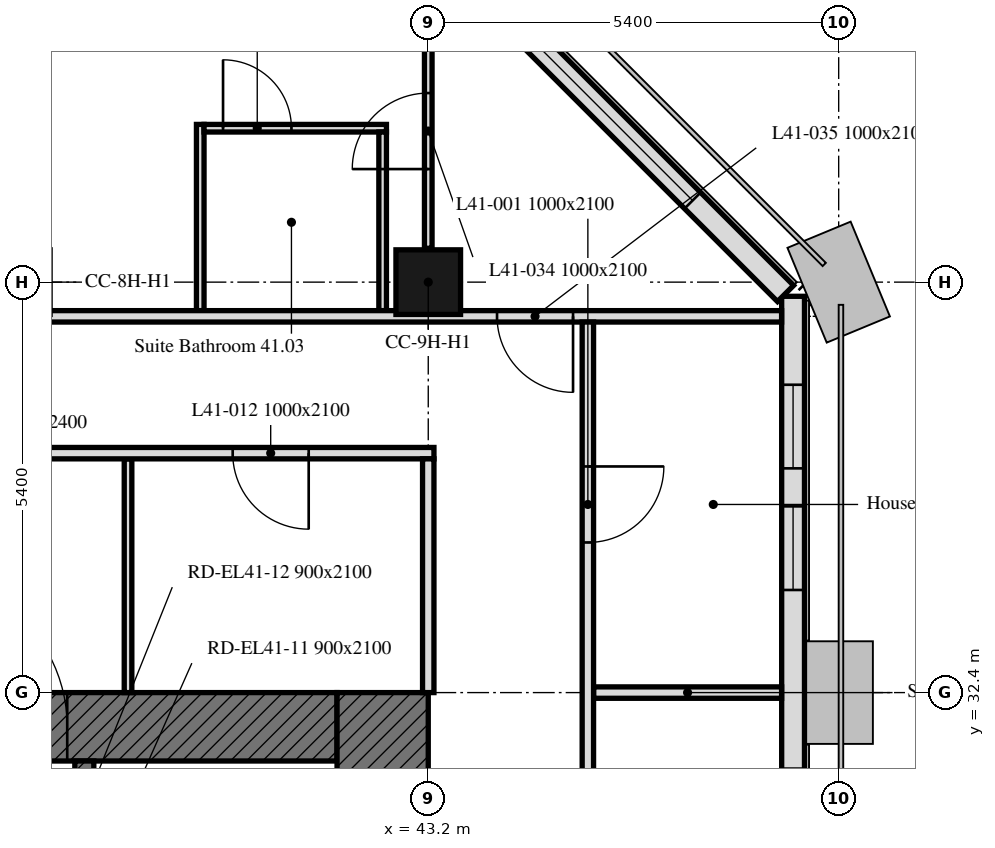
"""IFC4 building model, lengths in metres.
Left out: names, types, materials, properties, quantities, classifications, styles, units other than length and angle.
Written with IfcOpenShell. Run it as: python <this file> out.ifc"""

import sys

from ifc_helpers import new_model, si_unit, direction, frame, frame_2d, origin, origin_2d, place, context, subcontext, project, spatial, rectangle, extrude, element, fill, save


model = new_model("IFC4")
c1 = context("Model", 3, precision=1e-05, world=origin(), true_north=direction((0.0, 1.0)))
c2 = subcontext(c1, "Body", "Model", "MODEL_VIEW")
j1 = project(units=[si_unit("LENGTHUNIT", "METRE"), si_unit("PLANEANGLEUNIT", "RADIAN")], contexts=[c1])
p1 = place(None, origin())
s1 = spatial("IfcSite", under=j1, at=p1, CompositionType="ELEMENT")
p2 = place(p1, origin())
s2 = spatial("IfcBuilding", under=s1, at=p2, CompositionType="ELEMENT")
p3 = place(p2, frame((0.0, 0.0, 172.6)))
s3 = spatial("IfcBuildingStorey", under=s2, at=p3, CompositionType="ELEMENT", Elevation=172.6)
p4 = place(p3, frame((43.2, 37.8, 0.0), z_axis=(0.0, 0.0, 1.0), x_axis=(1.0, 0.0, 0.0)))
e1 = element("IfcColumn", 1, at=p4, inside=s3, PredefinedType="COLUMN", context=c2, shape_type="SweptSolid", body=[
    extrude(rectangle(XDim=0.85, YDim=0.85, at=origin_2d()), origin(), (0.0, 0.0, 1.0), 2.8),
])
p5 = place(p3, frame((48.0, 5.586, 0.0), z_axis=(0.0, 0.0, 1.0), x_axis=(0.0, 1.0, 0.0)))
e2 = element("IfcWall", 2, at=p5, inside=s3, PredefinedType="SOLIDWALL", context=c2, shape_type="SweptSolid", body=[
    extrude(rectangle(XDim=32.027, YDim=0.3, at=frame_2d((16.014, 0.0))), origin(), (0.0, 0.0, 1.0), 2.8),
])
p6 = place(p5, frame((1.164, 0.0, 0.9)))
e3 = element("IfcOpeningElement", 3, at=p6, cuts=e2, PredefinedType="OPENING", context=c2, shape_type="SweptSolid", body=[
    extrude(rectangle(XDim=1.1, YDim=1.7, at=frame_2d((0.55, 0.85))), frame((0.0, 0.16, 0.0), z_axis=(0.0, -1.0, 0.0), x_axis=(1.0, 0.0, 0.0)), (0.0, 0.0, 1.0), 0.32),
])
p7 = place(p5, frame((2.764, 0.0, 0.9)))
e4 = element("IfcOpeningElement", 4, at=p7, cuts=e2, PredefinedType="OPENING", context=c2, shape_type="SweptSolid", body=[
    extrude(rectangle(XDim=1.1, YDim=1.7, at=frame_2d((0.55, 0.85))), frame((0.0, 0.16, 0.0), z_axis=(0.0, -1.0, 0.0), x_axis=(1.0, 0.0, 0.0)), (0.0, 0.0, 1.0), 0.32),
])
p8 = place(p5, frame((6.564, 0.0, 0.9)))
e5 = element("IfcOpeningElement", 5, at=p8, cuts=e2, PredefinedType="OPENING", context=c2, shape_type="SweptSolid", body=[
    extrude(rectangle(XDim=1.1, YDim=1.7, at=frame_2d((0.55, 0.85))), frame((0.0, 0.16, 0.0), z_axis=(0.0, -1.0, 0.0), x_axis=(1.0, 0.0, 0.0)), (0.0, 0.0, 1.0), 0.32),
])
p9 = place(p5, frame((8.164, 0.0, 0.9)))
e6 = element("IfcOpeningElement", 6, at=p9, cuts=e2, PredefinedType="OPENING", context=c2, shape_type="SweptSolid", body=[
    extrude(rectangle(XDim=1.1, YDim=1.7, at=frame_2d((0.55, 0.85))), frame((0.0, 0.16, 0.0), z_axis=(0.0, -1.0, 0.0), x_axis=(1.0, 0.0, 0.0)), (0.0, 0.0, 1.0), 0.32),
])
p10 = place(p5, frame((11.614, 0.0, 0.9)))
e7 = element("IfcOpeningElement", 7, at=p10, cuts=e2, PredefinedType="OPENING", context=c2, shape_type="SweptSolid", body=[
    extrude(rectangle(XDim=3.4, YDim=1.7, at=frame_2d((1.7, 0.85))), frame((0.0, 0.16, 0.0), z_axis=(0.0, -1.0, 0.0), x_axis=(1.0, 0.0, 0.0)), (0.0, 0.0, 1.0), 0.32),
])
p11 = place(p5, frame((17.364, 0.0, 0.9)))
e8 = element("IfcOpeningElement", 8, at=p11, cuts=e2, PredefinedType="OPENING", context=c2, shape_type="SweptSolid", body=[
    extrude(rectangle(XDim=1.1, YDim=1.7, at=frame_2d((0.55, 0.85))), frame((0.0, 0.16, 0.0), z_axis=(0.0, -1.0, 0.0), x_axis=(1.0, 0.0, 0.0)), (0.0, 0.0, 1.0), 0.32),
])
p12 = place(p5, frame((18.964, 0.0, 0.9)))
e9 = element("IfcOpeningElement", 9, at=p12, cuts=e2, PredefinedType="OPENING", context=c2, shape_type="SweptSolid", body=[
    extrude(rectangle(XDim=1.1, YDim=1.7, at=frame_2d((0.55, 0.85))), frame((0.0, 0.16, 0.0), z_axis=(0.0, -1.0, 0.0), x_axis=(1.0, 0.0, 0.0)), (0.0, 0.0, 1.0), 0.32),
])
p13 = place(p5, frame((22.414, 0.0, 0.9)))
e10 = element("IfcOpeningElement", 10, at=p13, cuts=e2, PredefinedType="OPENING", context=c2, shape_type="SweptSolid", body=[
    extrude(rectangle(XDim=3.4, YDim=1.7, at=frame_2d((1.7, 0.85))), frame((0.0, 0.16, 0.0), z_axis=(0.0, -1.0, 0.0), x_axis=(1.0, 0.0, 0.0)), (0.0, 0.0, 1.0), 0.32),
])
p14 = place(p5, frame((28.164, 0.0, 0.9)))
e11 = element("IfcOpeningElement", 11, at=p14, cuts=e2, PredefinedType="OPENING", context=c2, shape_type="SweptSolid", body=[
    extrude(rectangle(XDim=1.1, YDim=1.7, at=frame_2d((0.55, 0.85))), frame((0.0, 0.16, 0.0), z_axis=(0.0, -1.0, 0.0), x_axis=(1.0, 0.0, 0.0)), (0.0, 0.0, 1.0), 0.32),
])
p15 = place(p5, frame((29.764, 0.0, 0.9)))
e12 = element("IfcOpeningElement", 12, at=p15, cuts=e2, PredefinedType="OPENING", context=c2, shape_type="SweptSolid", body=[
    extrude(rectangle(XDim=1.1, YDim=1.7, at=frame_2d((0.55, 0.85))), frame((0.0, 0.16, 0.0), z_axis=(0.0, -1.0, 0.0), x_axis=(1.0, 0.0, 0.0)), (0.0, 0.0, 1.0), 0.32),
])
p16 = place(p3, frame((47.901, 37.65, 0.0), z_axis=(0.0, 0.0, 1.0), x_axis=(-0.707106781187, 0.707106781187, 0.0)))
e13 = element("IfcWall", 13, at=p16, inside=s3, PredefinedType="SOLIDWALL", context=c2, shape_type="SweptSolid", body=[
    extrude(rectangle(XDim=6.86, YDim=0.3, at=frame_2d((3.43, 0.0))), origin(), (0.0, 0.0, 1.0), 2.8),
])
p17 = place(p16, frame((1.73, 0.0, 0.9)))
e14 = element("IfcOpeningElement", 14, at=p17, cuts=e13, PredefinedType="OPENING", context=c2, shape_type="SweptSolid", body=[
    extrude(rectangle(XDim=3.4, YDim=1.7, at=frame_2d((1.7, 0.85))), frame((0.0, 0.16, 0.0), z_axis=(0.0, -1.0, 0.0), x_axis=(1.0, 0.0, 0.0)), (0.0, 0.0, 1.0), 0.32),
])
p18 = place(p3, frame((30.9, 31.95, 0.0), z_axis=(0.0, 0.0, 1.0), x_axis=(1.0, 0.0, 0.0)))
e15 = element("IfcWall", 15, at=p18, inside=s3, PredefinedType="SOLIDWALL", context=c2, shape_type="SweptSolid", body=[
    extrude(rectangle(XDim=11.1, YDim=0.9, at=frame_2d((5.55, 0.0))), origin(), (0.0, 0.0, 1.0), 2.8),
])
p19 = place(p18, frame((5.55, 0.0, 0.0)))
e16 = element("IfcOpeningElement", 16, at=p19, cuts=e15, PredefinedType="OPENING", context=c2, shape_type="SweptSolid", body=[
    extrude(rectangle(XDim=2.0, YDim=2.4, at=frame_2d((1.0, 1.2))), frame((0.0, 0.45, 0.0), z_axis=(0.0, -1.0, 0.0), x_axis=(1.0, 0.0, 0.0)), (0.0, 0.0, 1.0), 0.9),
])
p20 = place(p3, frame((42.6, 32.4, 0.0), z_axis=(0.0, 0.0, 1.0), x_axis=(0.0, -1.0, 0.0)))
e17 = element("IfcWall", 17, at=p20, inside=s3, PredefinedType="SOLIDWALL", context=c2, shape_type="SweptSolid", body=[
    extrude(rectangle(XDim=16.2, YDim=1.2, at=frame_2d((8.1, 0.0))), origin(), (0.0, 0.0, 1.0), 2.8),
])
p21 = place(p3, frame((38.675, 17.1, 0.0), z_axis=(0.0, 0.0, 1.0), x_axis=(0.0, 1.0, 0.0)))
e18 = element("IfcWall", 18, at=p21, inside=s3, PredefinedType="SOLIDWALL", context=c2, shape_type="SweptSolid", body=[
    extrude(rectangle(XDim=14.4, YDim=0.25, at=frame_2d((7.2, 0.0))), origin(), (0.0, 0.0, 1.0), 2.8),
])
p22 = place(p21, frame((4.6, 0.0, 0.0)))
e19 = element("IfcOpeningElement", 19, at=p22, cuts=e18, PredefinedType="OPENING", context=c2, shape_type="SweptSolid", body=[
    extrude(rectangle(XDim=1.0, YDim=2.1, at=frame_2d((0.5, 1.05))), frame((0.0, 0.125, 0.0), z_axis=(0.0, -1.0, 0.0), x_axis=(1.0, 0.0, 0.0)), (0.0, 0.0, 1.0), 0.25),
])
p23 = place(p21, frame((7.062, 0.0, 0.0)))
e20 = element("IfcOpeningElement", 20, at=p23, cuts=e18, PredefinedType="OPENING", context=c2, shape_type="SweptSolid", body=[
    extrude(rectangle(XDim=1.2, YDim=2.1, at=frame_2d((0.6, 1.05))), frame((0.0, 0.125, 0.0), z_axis=(0.0, -1.0, 0.0), x_axis=(1.0, 0.0, 0.0)), (0.0, 0.0, 1.0), 0.25),
])
p24 = place(p21, frame((9.472, 0.0, 0.0)))
e21 = element("IfcOpeningElement", 21, at=p24, cuts=e18, PredefinedType="OPENING", context=c2, shape_type="SweptSolid", body=[
    extrude(rectangle(XDim=0.9, YDim=2.1, at=frame_2d((0.45, 1.05))), frame((0.0, 0.125, 0.0), z_axis=(0.0, -1.0, 0.0), x_axis=(1.0, 0.0, 0.0)), (0.0, 0.0, 1.0), 0.25),
])
p25 = place(p21, frame((10.779, 0.0, 0.0)))
e22 = element("IfcOpeningElement", 22, at=p25, cuts=e18, PredefinedType="OPENING", context=c2, shape_type="SweptSolid", body=[
    extrude(rectangle(XDim=0.9, YDim=2.1, at=frame_2d((0.45, 1.05))), frame((0.0, 0.125, 0.0), z_axis=(0.0, -1.0, 0.0), x_axis=(1.0, 0.0, 0.0)), (0.0, 0.0, 1.0), 0.25),
])
p26 = place(p21, frame((12.048, 0.0, 0.0)))
e23 = element("IfcOpeningElement", 23, at=p26, cuts=e18, PredefinedType="OPENING", context=c2, shape_type="SweptSolid", body=[
    extrude(rectangle(XDim=0.9, YDim=2.1, at=frame_2d((0.45, 1.05))), frame((0.0, 0.125, 0.0), z_axis=(0.0, -1.0, 0.0), x_axis=(1.0, 0.0, 0.0)), (0.0, 0.0, 1.0), 0.25),
])
p27 = place(p21, frame((13.354, 0.0, 0.0)))
e24 = element("IfcOpeningElement", 24, at=p27, cuts=e18, PredefinedType="OPENING", context=c2, shape_type="SweptSolid", body=[
    extrude(rectangle(XDim=0.9, YDim=2.1, at=frame_2d((0.45, 1.05))), frame((0.0, 0.125, 0.0), z_axis=(0.0, -1.0, 0.0), x_axis=(1.0, 0.0, 0.0)), (0.0, 0.0, 1.0), 0.25),
])
p28 = place(p3, frame((45.375, 32.4, 0.0), z_axis=(0.0, 0.0, 1.0), x_axis=(1.0, 0.0, 0.0)))
e25 = element("IfcWall", 25, at=p28, inside=s3, PredefinedType="PARTITIONING", context=c2, shape_type="SweptSolid", body=[
    extrude(rectangle(XDim=2.474, YDim=0.15, at=frame_2d((1.237, 0.0))), origin(), (0.0, 0.0, 1.0), 2.2),
])
p29 = place(p3, frame((40.2, 37.425, 0.0), z_axis=(0.0, 0.0, 1.0), x_axis=(0.0, 1.0, 0.0)))
e26 = element("IfcWall", 26, at=p29, inside=s3, PredefinedType="PARTITIONING", context=c2, shape_type="SweptSolid", body=[
    extrude(rectangle(XDim=2.45, YDim=0.1, at=frame_2d((1.225, 0.0))), origin(), (0.0, 0.0, 1.0), 2.8),
])
p30 = place(p3, frame((40.25, 39.825, 0.0), z_axis=(0.0, 0.0, 1.0), x_axis=(1.0, 0.0, 0.0)))
e27 = element("IfcWall", 27, at=p30, inside=s3, PredefinedType="PARTITIONING", context=c2, shape_type="SweptSolid", body=[
    extrude(rectangle(XDim=2.4, YDim=0.1, at=frame_2d((1.2, 0.0))), origin(), (0.0, 0.0, 1.0), 2.8),
])
p31 = place(p30, frame((0.25, 0.0, 0.0)))
e28 = element("IfcOpeningElement", 28, at=p31, cuts=e27, PredefinedType="OPENING", context=c2, shape_type="SweptSolid", body=[
    extrude(rectangle(XDim=0.9, YDim=2.1, at=frame_2d((0.45, 1.05))), frame((0.0, 0.05, 0.0), z_axis=(0.0, -1.0, 0.0), x_axis=(1.0, 0.0, 0.0)), (0.0, 0.0, 1.0), 0.1),
])
p32 = place(p3, frame((42.6, 39.775, 0.0), z_axis=(0.0, 0.0, 1.0), x_axis=(0.0, -1.0, 0.0)))
e29 = element("IfcWall", 29, at=p32, inside=s3, PredefinedType="PARTITIONING", context=c2, shape_type="SweptSolid", body=[
    extrude(rectangle(XDim=2.35, YDim=0.1, at=frame_2d((1.175, 0.0))), origin(), (0.0, 0.0, 1.0), 2.8),
])
p33 = place(p3, frame((43.2, 38.245, 0.0), z_axis=(0.0, 0.0, 1.0), x_axis=(0.0, 1.0, 0.0)))
e30 = element("IfcWall", 30, at=p33, inside=s3, PredefinedType="PARTITIONING", context=c2, shape_type="SweptSolid", body=[
    extrude(rectangle(XDim=3.843, YDim=0.1, at=frame_2d((1.921, 0.0))), origin(), (0.0, 0.0, 1.0), 2.8),
])
p34 = place(p33, frame((1.042, 0.0, 0.0)))
e31 = element("IfcOpeningElement", 31, at=p34, cuts=e30, PredefinedType="OPENING", context=c2, shape_type="SweptSolid", body=[
    extrude(rectangle(XDim=1.0, YDim=2.1, at=frame_2d((0.5, 1.05))), frame((0.0, 0.05, 0.0), z_axis=(0.0, -1.0, 0.0), x_axis=(1.0, 0.0, 0.0)), (0.0, 0.0, 1.0), 0.1),
])
p35 = place(p3, frame((47.849, 37.35, 0.0), z_axis=(0.0, 0.0, 1.0), x_axis=(-1.0, 0.0, 0.0)))
e32 = element("IfcWall", 32, at=p35, inside=s3, PredefinedType="PARTITIONING", context=c2, shape_type="SweptSolid", body=[
    extrude(rectangle(XDim=41.698, YDim=0.15, at=frame_2d((20.849, 0.0))), origin(), (0.0, 0.0, 1.0), 2.8),
])
p36 = place(p35, frame((39.249, 0.0, 0.0)))
e33 = element("IfcOpeningElement", 33, at=p36, cuts=e32, PredefinedType="OPENING", context=c2, shape_type="SweptSolid", body=[
    extrude(rectangle(XDim=1.0, YDim=2.1, at=frame_2d((0.5, 1.05))), frame((0.0, 0.075, 0.0), z_axis=(0.0, -1.0, 0.0), x_axis=(1.0, 0.0, 0.0)), (0.0, 0.0, 1.0), 0.15),
])
p37 = place(p35, frame((27.649, 0.0, 0.0)))
e34 = element("IfcOpeningElement", 34, at=p37, cuts=e32, PredefinedType="OPENING", context=c2, shape_type="SweptSolid", body=[
    extrude(rectangle(XDim=1.0, YDim=2.1, at=frame_2d((0.5, 1.05))), frame((0.0, 0.075, 0.0), z_axis=(0.0, -1.0, 0.0), x_axis=(1.0, 0.0, 0.0)), (0.0, 0.0, 1.0), 0.15),
])
p38 = place(p35, frame((22.249, 0.0, 0.0)))
e35 = element("IfcOpeningElement", 35, at=p38, cuts=e32, PredefinedType="OPENING", context=c2, shape_type="SweptSolid", body=[
    extrude(rectangle(XDim=1.0, YDim=2.1, at=frame_2d((0.5, 1.05))), frame((0.0, 0.075, 0.0), z_axis=(0.0, -1.0, 0.0), x_axis=(1.0, 0.0, 0.0)), (0.0, 0.0, 1.0), 0.15),
])
p39 = place(p35, frame((17.649, 0.0, 0.0)))
e36 = element("IfcOpeningElement", 36, at=p39, cuts=e32, PredefinedType="OPENING", context=c2, shape_type="SweptSolid", body=[
    extrude(rectangle(XDim=1.0, YDim=2.1, at=frame_2d((0.5, 1.05))), frame((0.0, 0.075, 0.0), z_axis=(0.0, -1.0, 0.0), x_axis=(1.0, 0.0, 0.0)), (0.0, 0.0, 1.0), 0.15),
])
p40 = place(p35, frame((2.744, 0.0, 0.0)))
e37 = element("IfcOpeningElement", 37, at=p40, cuts=e32, PredefinedType="OPENING", context=c2, shape_type="SweptSolid", body=[
    extrude(rectangle(XDim=1.0, YDim=2.1, at=frame_2d((0.5, 1.05))), frame((0.0, 0.075, 0.0), z_axis=(0.0, -1.0, 0.0), x_axis=(1.0, 0.0, 0.0)), (0.0, 0.0, 1.0), 0.15),
])
p41 = place(p3, frame((45.3, 37.275, 0.0), z_axis=(0.0, 0.0, 1.0), x_axis=(0.0, -1.0, 0.0)))
e38 = element("IfcWall", 38, at=p41, inside=s3, PredefinedType="PARTITIONING", context=c2, shape_type="SweptSolid", body=[
    extrude(rectangle(XDim=15.6, YDim=0.15, at=frame_2d((7.8, 0.0))), origin(), (0.0, 0.0, 1.0), 2.2),
])
p42 = place(p41, frame((1.9, 0.0, 0.0)))
e39 = element("IfcOpeningElement", 39, at=p42, cuts=e38, PredefinedType="OPENING", context=c2, shape_type="SweptSolid", body=[
    extrude(rectangle(XDim=1.0, YDim=2.1, at=frame_2d((0.5, 1.05))), frame((0.0, 0.075, 0.0), z_axis=(0.0, -1.0, 0.0), x_axis=(1.0, 0.0, 0.0)), (0.0, 0.0, 1.0), 0.15),
])
p43 = place(p41, frame((8.425, 0.0, 0.0)))
e40 = element("IfcOpeningElement", 40, at=p43, cuts=e38, PredefinedType="OPENING", context=c2, shape_type="SweptSolid", body=[
    extrude(rectangle(XDim=1.0, YDim=2.1, at=frame_2d((0.5, 1.05))), frame((0.0, 0.075, 0.0), z_axis=(0.0, -1.0, 0.0), x_axis=(1.0, 0.0, 0.0)), (0.0, 0.0, 1.0), 0.15),
])
p44 = place(p3, frame((39.25, 32.4, 0.0), z_axis=(0.0, 0.0, 1.0), x_axis=(0.0, 1.0, 0.0)))
e41 = element("IfcWall", 41, at=p44, inside=s3, PredefinedType="PARTITIONING", context=c2, shape_type="SweptSolid", body=[
    extrude(rectangle(XDim=3.075, YDim=0.1, at=frame_2d((1.538, 0.0))), origin(), (0.0, 0.0, 1.0), 2.8),
])
p45 = place(p3, frame((43.275, 35.55, 0.0), z_axis=(0.0, 0.0, 1.0), x_axis=(-1.0, 0.0, 0.0)))
e42 = element("IfcWall", 42, at=p45, inside=s3, PredefinedType="PARTITIONING", context=c2, shape_type="SweptSolid", body=[
    extrude(rectangle(XDim=33.825, YDim=0.15, at=frame_2d((16.913, 0.0))), origin(), (0.0, 0.0, 1.0), 2.8),
])
p46 = place(p45, frame((23.875, 0.0, 0.0)))
e43 = element("IfcOpeningElement", 43, at=p46, cuts=e42, PredefinedType="OPENING", context=c2, shape_type="SweptSolid", body=[
    extrude(rectangle(XDim=1.0, YDim=2.1, at=frame_2d((0.5, 1.05))), frame((0.0, 0.075, 0.0), z_axis=(0.0, -1.0, 0.0), x_axis=(1.0, 0.0, 0.0)), (0.0, 0.0, 1.0), 0.15),
])
p47 = place(p45, frame((13.475, 0.0, 0.0)))
e44 = element("IfcOpeningElement", 44, at=p47, cuts=e42, PredefinedType="OPENING", context=c2, shape_type="SweptSolid", body=[
    extrude(rectangle(XDim=1.0, YDim=2.1, at=frame_2d((0.5, 1.05))), frame((0.0, 0.075, 0.0), z_axis=(0.0, -1.0, 0.0), x_axis=(1.0, 0.0, 0.0)), (0.0, 0.0, 1.0), 0.15),
])
p48 = place(p45, frame((8.337, 0.0, 0.0)))
e45 = element("IfcOpeningElement", 45, at=p48, cuts=e42, PredefinedType="OPENING", context=c2, shape_type="SweptSolid", body=[
    extrude(rectangle(XDim=1.0, YDim=2.1, at=frame_2d((0.5, 1.05))), frame((0.0, 0.075, 0.0), z_axis=(0.0, -1.0, 0.0), x_axis=(1.0, 0.0, 0.0)), (0.0, 0.0, 1.0), 0.15),
])
p49 = place(p45, frame((1.648, 0.0, 0.0)))
e46 = element("IfcOpeningElement", 46, at=p49, cuts=e42, PredefinedType="OPENING", context=c2, shape_type="SweptSolid", body=[
    extrude(rectangle(XDim=1.0, YDim=2.1, at=frame_2d((0.5, 1.05))), frame((0.0, 0.075, 0.0), z_axis=(0.0, -1.0, 0.0), x_axis=(1.0, 0.0, 0.0)), (0.0, 0.0, 1.0), 0.15),
])
p50 = place(p45, frame((28.613, 0.0, 0.0)))
e47 = element("IfcOpeningElement", 47, at=p50, cuts=e42, PredefinedType="OPENING", context=c2, shape_type="SweptSolid", body=[
    extrude(rectangle(XDim=1.0, YDim=2.1, at=frame_2d((0.5, 1.05))), frame((0.0, 0.075, 0.0), z_axis=(0.0, -1.0, 0.0), x_axis=(1.0, 0.0, 0.0)), (0.0, 0.0, 1.0), 0.15),
])
p51 = place(p45, frame((30.625, 0.0, 0.0)))
e48 = element("IfcOpeningElement", 48, at=p51, cuts=e42, PredefinedType="OPENING", context=c2, shape_type="SweptSolid", body=[
    extrude(rectangle(XDim=1.8, YDim=2.4, at=frame_2d((0.9, 1.2))), frame((0.0, 0.075, 0.0), z_axis=(0.0, -1.0, 0.0), x_axis=(1.0, 0.0, 0.0)), (0.0, 0.0, 1.0), 0.15),
])
p52 = place(p45, frame((5.525, 0.0, 0.0)))
e49 = element("IfcOpeningElement", 49, at=p52, cuts=e42, PredefinedType="OPENING", context=c2, shape_type="SweptSolid", body=[
    extrude(rectangle(XDim=1.8, YDim=2.4, at=frame_2d((0.9, 1.2))), frame((0.0, 0.075, 0.0), z_axis=(0.0, -1.0, 0.0), x_axis=(1.0, 0.0, 0.0)), (0.0, 0.0, 1.0), 0.15),
])
p53 = place(p3, frame((43.2, 35.475, 0.0), z_axis=(0.0, 0.0, 1.0), x_axis=(0.0, -1.0, 0.0)))
e50 = element("IfcWall", 50, at=p53, inside=s3, PredefinedType="PARTITIONING", context=c2, shape_type="SweptSolid", body=[
    extrude(rectangle(XDim=3.075, YDim=0.15, at=frame_2d((1.538, 0.0))), origin(), (0.0, 0.0, 1.0), 2.8),
])
p54 = place(p14, origin())
e51 = element("IfcWindow", 51, at=p54, inside=s3, PartitioningType="SINGLE_PANEL", PredefinedType="WINDOW", context=c2, shape_type="SweptSolid", body=[
    extrude(rectangle(XDim=1.1, YDim=1.7, at=frame_2d((0.55, 0.85))), frame((0.0, 0.03, 0.0), z_axis=(0.0, -1.0, 0.0), x_axis=(1.0, 0.0, 0.0)), (0.0, 0.0, 1.0), 0.06),
])
fill(e11, e51)
p55 = place(p15, origin())
e52 = element("IfcWindow", 52, at=p55, inside=s3, PartitioningType="SINGLE_PANEL", PredefinedType="WINDOW", context=c2, shape_type="SweptSolid", body=[
    extrude(rectangle(XDim=1.1, YDim=1.7, at=frame_2d((0.55, 0.85))), frame((0.0, 0.03, 0.0), z_axis=(0.0, -1.0, 0.0), x_axis=(1.0, 0.0, 0.0)), (0.0, 0.0, 1.0), 0.06),
])
fill(e12, e52)
p56 = place(p17, origin())
e53 = element("IfcWindow", 53, at=p56, inside=s3, PartitioningType="SINGLE_PANEL", PredefinedType="WINDOW", context=c2, shape_type="SweptSolid", body=[
    extrude(rectangle(XDim=3.4, YDim=1.7, at=frame_2d((1.7, 0.85))), frame((0.0, 0.03, 0.0), z_axis=(0.0, -1.0, 0.0), x_axis=(1.0, 0.0, 0.0)), (0.0, 0.0, 1.0), 0.06),
])
fill(e14, e53)
p57 = place(p19, origin())
e54 = element("IfcDoor", 54, at=p57, inside=s3, OperationType="DOUBLE_DOOR_SINGLE_SWING", PredefinedType="DOOR", context=c2, shape_type="SweptSolid", body=[
    extrude(rectangle(XDim=2.0, YDim=2.4, at=frame_2d((1.0, 1.2))), frame((0.0, 0.025, 0.0), z_axis=(0.0, -1.0, 0.0), x_axis=(1.0, 0.0, 0.0)), (0.0, 0.0, 1.0), 0.05),
])
fill(e16, e54)
p58 = place(p42, origin())
e55 = element("IfcDoor", 55, at=p58, inside=s3, OperationType="SINGLE_SWING_LEFT", PredefinedType="DOOR", context=c2, shape_type="SweptSolid", body=[
    extrude(rectangle(XDim=1.0, YDim=2.1, at=frame_2d((0.5, 1.05))), frame((0.0, 0.025, 0.0), z_axis=(0.0, -1.0, 0.0), x_axis=(1.0, 0.0, 0.0)), (0.0, 0.0, 1.0), 0.05),
])
fill(e39, e55)
p59 = place(p31, origin())
e56 = element("IfcDoor", 56, at=p59, inside=s3, OperationType="SINGLE_SWING_LEFT", PredefinedType="DOOR", context=c2, shape_type="SweptSolid", body=[
    extrude(rectangle(XDim=0.9, YDim=2.1, at=frame_2d((0.45, 1.05))), frame((0.0, 0.025, 0.0), z_axis=(0.0, -1.0, 0.0), x_axis=(1.0, 0.0, 0.0)), (0.0, 0.0, 1.0), 0.05),
])
fill(e28, e56)
p60 = place(p49, origin())
e57 = element("IfcDoor", 57, at=p60, inside=s3, OperationType="SINGLE_SWING_RIGHT", PredefinedType="DOOR", context=c2, shape_type="SweptSolid", body=[
    extrude(rectangle(XDim=1.0, YDim=2.1, at=frame_2d((0.5, 1.05))), frame((0.0, 0.025, 0.0), z_axis=(0.0, -1.0, 0.0), x_axis=(1.0, 0.0, 0.0)), (0.0, 0.0, 1.0), 0.05),
])
fill(e46, e57)
p61 = place(p34, origin())
e58 = element("IfcDoor", 58, at=p61, inside=s3, OperationType="SINGLE_SWING_LEFT", PredefinedType="DOOR", context=c2, shape_type="SweptSolid", body=[
    extrude(rectangle(XDim=1.0, YDim=2.1, at=frame_2d((0.5, 1.05))), frame((0.0, 0.025, 0.0), z_axis=(0.0, -1.0, 0.0), x_axis=(1.0, 0.0, 0.0)), (0.0, 0.0, 1.0), 0.05),
])
fill(e31, e58)
p62 = place(p40, origin())
e59 = element("IfcDoor", 59, at=p62, inside=s3, OperationType="SINGLE_SWING_RIGHT", PredefinedType="DOOR", context=c2, shape_type="SweptSolid", body=[
    extrude(rectangle(XDim=1.0, YDim=2.1, at=frame_2d((0.5, 1.05))), frame((0.0, 0.025, 0.0), z_axis=(0.0, -1.0, 0.0), x_axis=(1.0, 0.0, 0.0)), (0.0, 0.0, 1.0), 0.05),
])
fill(e37, e59)
save(model, sys.argv[1])
